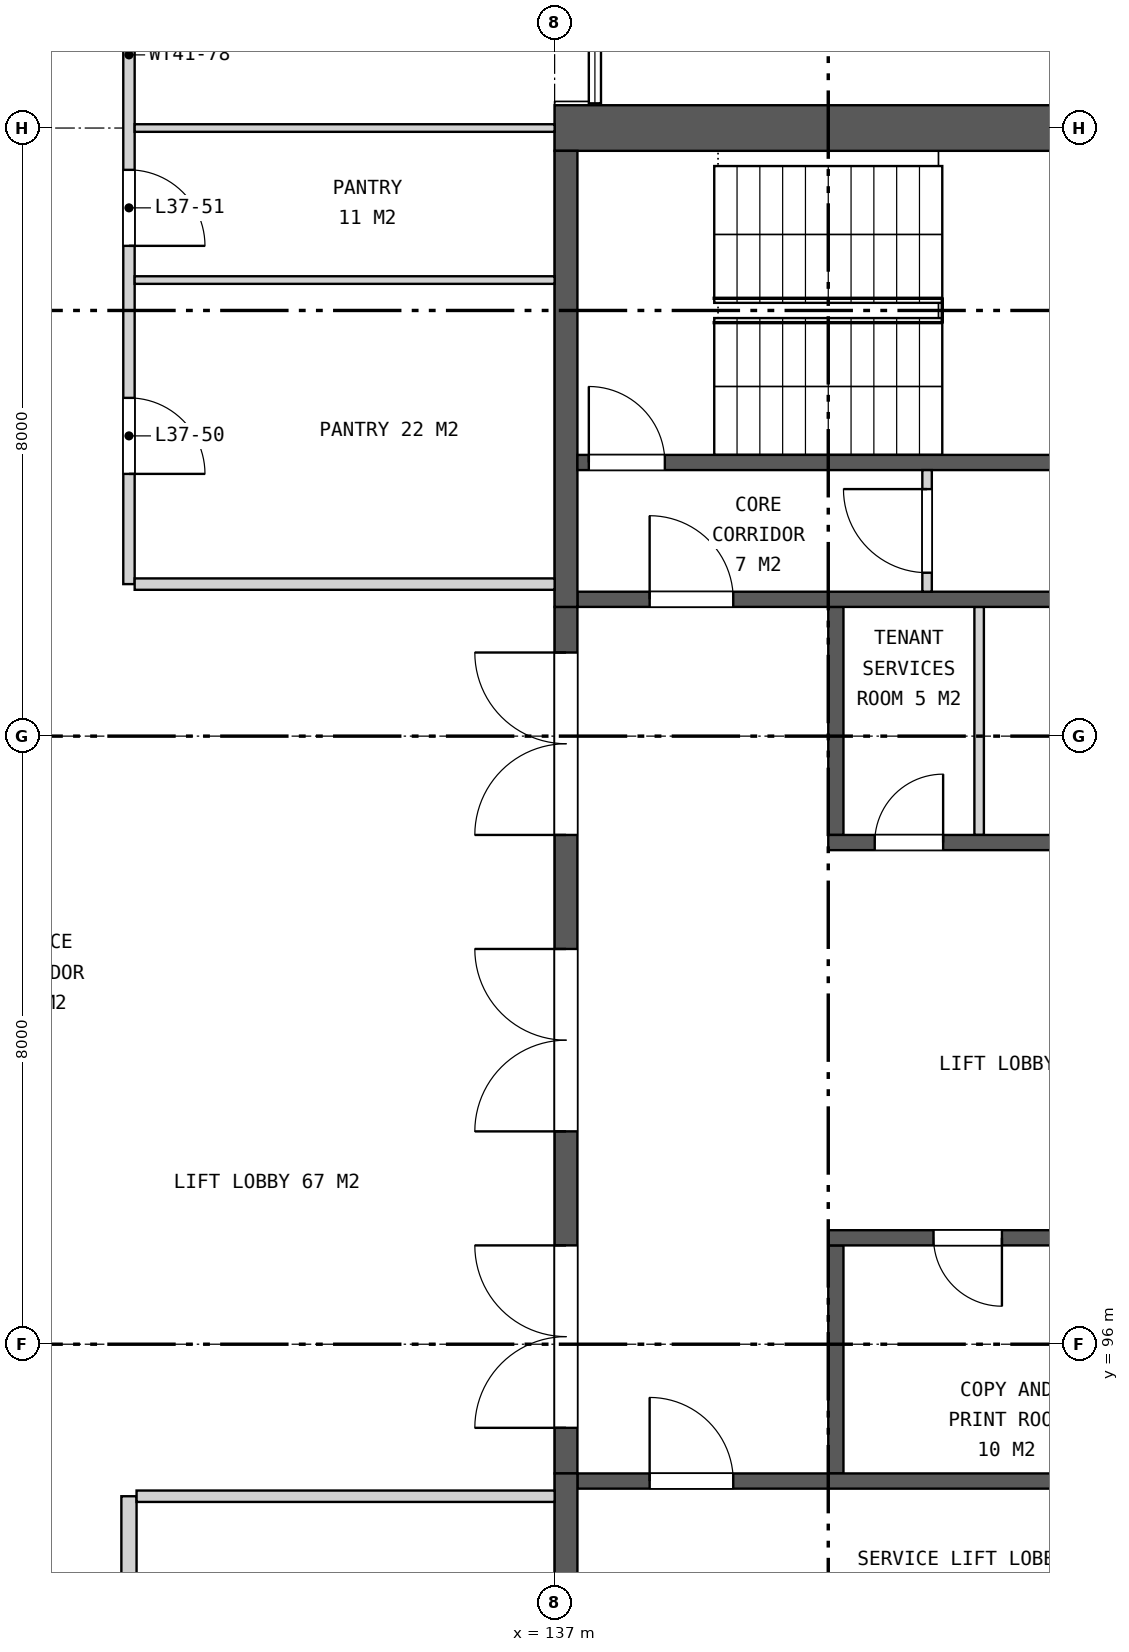
"""IFC4 building model, lengths in metres.
Left out: names, types, materials, properties, quantities, classifications, styles, units other than length and angle.
Written with IfcOpenShell. Run it as: python <this file> out.ifc"""

import sys

from ifc_helpers import new_model, si_unit, direction, frame, frame_2d, origin, place, context, subcontext, project, spatial, rectangle, extrude, element, fill, save


model = new_model("IFC4")
c1 = context("Model", 3, precision=1e-05, world=origin(), true_north=direction((0.0, 1.0)))
c2 = subcontext(c1, "Body", "Model", "MODEL_VIEW")
j1 = project(units=[si_unit("LENGTHUNIT", "METRE"), si_unit("PLANEANGLEUNIT", "RADIAN")], contexts=[c1])
p1 = place(None, origin())
s1 = spatial("IfcSite", under=j1, at=p1, CompositionType="ELEMENT")
p2 = place(p1, origin())
s2 = spatial("IfcBuilding", under=s1, at=p2, CompositionType="ELEMENT")
p3 = place(p2, frame((0.0, 0.0, 178.9)))
s3 = spatial("IfcBuildingStorey", under=s2, at=p3, CompositionType="ELEMENT", Elevation=178.9)
p4 = place(p3, frame((137.0, 112.0, 0.0), z_axis=(0.0, 0.0, 1.0), x_axis=(1.0, 0.0, 0.0)))
e1 = element("IfcWall", 1, at=p4, inside=s3, PredefinedType="SHEAR", context=c2, shape_type="SweptSolid", body=[
    extrude(rectangle(XDim=7.1, YDim=0.6, at=frame_2d((3.55, 0.0))), origin(), (0.0, 0.0, 1.0), 4.2),
])
p5 = place(p3, frame((137.15, 94.3, 0.0), z_axis=(0.0, 0.0, 1.0), x_axis=(0.0, 1.0, 0.0)))
e2 = element("IfcWall", 2, at=p5, inside=s3, PredefinedType="SHEAR", context=c2, shape_type="SweptSolid", body=[
    extrude(rectangle(XDim=11.4, YDim=0.3, at=frame_2d((5.7, 0.0))), origin(), (0.0, 0.0, 1.0), 4.2),
])
p6 = place(p5, frame((0.6, 0.0, 0.0)))
e3 = element("IfcOpeningElement", 3, at=p6, cuts=e2, PredefinedType="OPENING", context=c2, shape_type="SweptSolid", body=[
    extrude(rectangle(XDim=2.4, YDim=2.4, at=frame_2d((1.2, 1.2))), frame((0.0, 0.16, 0.0), z_axis=(0.0, -1.0, 0.0), x_axis=(1.0, 0.0, 0.0)), (0.0, 0.0, 1.0), 0.32),
])
p7 = place(p5, frame((4.5, 0.0, 0.0)))
e4 = element("IfcOpeningElement", 4, at=p7, cuts=e2, PredefinedType="OPENING", context=c2, shape_type="SweptSolid", body=[
    extrude(rectangle(XDim=2.4, YDim=2.4, at=frame_2d((1.2, 1.2))), frame((0.0, 0.16, 0.0), z_axis=(0.0, -1.0, 0.0), x_axis=(1.0, 0.0, 0.0)), (0.0, 0.0, 1.0), 0.32),
])
p8 = place(p5, frame((8.4, 0.0, 0.0)))
e5 = element("IfcOpeningElement", 5, at=p8, cuts=e2, PredefinedType="OPENING", context=c2, shape_type="SweptSolid", body=[
    extrude(rectangle(XDim=2.4, YDim=2.4, at=frame_2d((1.2, 1.2))), frame((0.0, 0.16, 0.0), z_axis=(0.0, -1.0, 0.0), x_axis=(1.0, 0.0, 0.0)), (0.0, 0.0, 1.0), 0.32),
])
p9 = place(p3, frame((140.7, 102.7, 0.0), z_axis=(0.0, 0.0, 1.0), x_axis=(0.0, 1.0, 0.0)))
e6 = element("IfcWall", 6, at=p9, inside=s3, PredefinedType="SHEAR", context=c2, shape_type="SweptSolid", body=[
    extrude(rectangle(XDim=3.0, YDim=0.2, at=frame_2d((1.5, 0.0))), origin(), (0.0, 0.0, 1.0), 4.2),
])
p10 = place(p3, frame((142.585, 102.7, 0.0), z_axis=(0.0, 0.0, 1.0), x_axis=(0.0, 1.0, 0.0)))
e7 = element("IfcWall", 7, at=p10, inside=s3, PredefinedType="PARTITIONING", context=c2, shape_type="SweptSolid", body=[
    extrude(rectangle(XDim=3.0, YDim=0.125, at=frame_2d((1.5, 0.0))), origin(), (0.0, 0.0, 1.0), 4.2),
])
p11 = place(p3, frame((140.6, 102.6, 0.0), z_axis=(0.0, 0.0, 1.0), x_axis=(1.0, 0.0, 0.0)))
e8 = element("IfcWall", 8, at=p11, inside=s3, PredefinedType="SHEAR", context=c2, shape_type="SweptSolid", body=[
    extrude(rectangle(XDim=12.1, YDim=0.2, at=frame_2d((6.05, 0.0))), origin(), (0.0, 0.0, 1.0), 4.2),
])
p12 = place(p11, frame((0.611, 0.0, 0.0)))
e9 = element("IfcOpeningElement", 9, at=p12, cuts=e8, PredefinedType="OPENING", context=c2, shape_type="SweptSolid", body=[
    extrude(rectangle(XDim=0.9, YDim=2.1, at=frame_2d((0.45, 1.05))), frame((0.0, 0.11, 0.0), z_axis=(0.0, -1.0, 0.0), x_axis=(1.0, 0.0, 0.0)), (0.0, 0.0, 1.0), 0.22),
])
p13 = place(p11, frame((4.808, 0.0, 0.0)))
e10 = element("IfcOpeningElement", 10, at=p13, cuts=e8, PredefinedType="OPENING", context=c2, shape_type="SweptSolid", body=[
    extrude(rectangle(XDim=0.9, YDim=2.1, at=frame_2d((0.45, 1.05))), frame((0.0, 0.11, 0.0), z_axis=(0.0, -1.0, 0.0), x_axis=(1.0, 0.0, 0.0)), (0.0, 0.0, 1.0), 0.22),
])
p14 = place(p11, frame((9.896, 0.0, 0.0)))
e11 = element("IfcOpeningElement", 11, at=p14, cuts=e8, PredefinedType="OPENING", context=c2, shape_type="SweptSolid", body=[
    extrude(rectangle(XDim=0.9, YDim=2.1, at=frame_2d((0.45, 1.05))), frame((0.0, 0.11, 0.0), z_axis=(0.0, -1.0, 0.0), x_axis=(1.0, 0.0, 0.0)), (0.0, 0.0, 1.0), 0.22),
])
p15 = place(p3, frame((140.7, 94.3, 0.0), z_axis=(0.0, 0.0, 1.0), x_axis=(0.0, 1.0, 0.0)))
e12 = element("IfcWall", 12, at=p15, inside=s3, PredefinedType="SHEAR", context=c2, shape_type="SweptSolid", body=[
    extrude(rectangle(XDim=3.0, YDim=0.2, at=frame_2d((1.5, 0.0))), origin(), (0.0, 0.0, 1.0), 4.2),
])
p16 = place(p3, frame((140.6, 97.4, 0.0), z_axis=(0.0, 0.0, 1.0), x_axis=(1.0, 0.0, 0.0)))
e13 = element("IfcWall", 13, at=p16, inside=s3, PredefinedType="SHEAR", context=c2, shape_type="SweptSolid", body=[
    extrude(rectangle(XDim=12.1, YDim=0.2, at=frame_2d((6.05, 0.0))), origin(), (0.0, 0.0, 1.0), 4.2),
])
p17 = place(p16, frame((1.385, 0.0, 0.0)))
e14 = element("IfcOpeningElement", 14, at=p17, cuts=e13, PredefinedType="OPENING", context=c2, shape_type="SweptSolid", body=[
    extrude(rectangle(XDim=0.9, YDim=2.1, at=frame_2d((0.45, 1.05))), frame((0.0, 0.11, 0.0), z_axis=(0.0, -1.0, 0.0), x_axis=(1.0, 0.0, 0.0)), (0.0, 0.0, 1.0), 0.22),
])
p18 = place(p16, frame((7.397, 0.0, 0.0)))
e15 = element("IfcOpeningElement", 15, at=p18, cuts=e13, PredefinedType="OPENING", context=c2, shape_type="SweptSolid", body=[
    extrude(rectangle(XDim=0.9, YDim=2.1, at=frame_2d((0.45, 1.05))), frame((0.0, 0.11, 0.0), z_axis=(0.0, -1.0, 0.0), x_axis=(1.0, 0.0, 0.0)), (0.0, 0.0, 1.0), 0.22),
])
p19 = place(p3, frame((137.3, 105.8, 0.0), z_axis=(0.0, 0.0, 1.0), x_axis=(1.0, 0.0, 0.0)))
e16 = element("IfcWall", 16, at=p19, inside=s3, PredefinedType="SHEAR", context=c2, shape_type="SweptSolid", body=[
    extrude(rectangle(XDim=15.4, YDim=0.2, at=frame_2d((7.7, 0.0))), origin(), (0.0, 0.0, 1.0), 4.2),
])
p20 = place(p19, frame((0.95, 0.0, 0.0)))
e17 = element("IfcOpeningElement", 17, at=p20, cuts=e16, PredefinedType="OPENING", context=c2, shape_type="SweptSolid", body=[
    extrude(rectangle(XDim=1.1, YDim=2.1, at=frame_2d((0.55, 1.05))), frame((0.0, 0.11, 0.0), z_axis=(0.0, -1.0, 0.0), x_axis=(1.0, 0.0, 0.0)), (0.0, 0.0, 1.0), 0.22),
])
p21 = place(p3, frame((137.15, 105.7, 0.0), z_axis=(0.0, 0.0, 1.0), x_axis=(0.0, 1.0, 0.0)))
e18 = element("IfcWall", 18, at=p21, inside=s3, PredefinedType="SHEAR", context=c2, shape_type="SweptSolid", body=[
    extrude(rectangle(XDim=6.0, YDim=0.3, at=frame_2d((3.0, 0.0))), origin(), (0.0, 0.0, 1.0), 4.2),
])
p22 = place(p3, frame((137.3, 107.6, 0.0), z_axis=(0.0, 0.0, 1.0), x_axis=(1.0, 0.0, 0.0)))
e19 = element("IfcWall", 19, at=p22, inside=s3, PredefinedType="SHEAR", context=c2, shape_type="SweptSolid", body=[
    extrude(rectangle(XDim=6.8, YDim=0.2, at=frame_2d((3.4, 0.0))), origin(), (0.0, 0.0, 1.0), 4.2),
])
p23 = place(p22, frame((0.15, 0.0, 0.0)))
e20 = element("IfcOpeningElement", 20, at=p23, cuts=e19, PredefinedType="OPENING", context=c2, shape_type="SweptSolid", body=[
    extrude(rectangle(XDim=1.0, YDim=2.1, at=frame_2d((0.5, 1.05))), frame((0.0, 0.11, 0.0), z_axis=(0.0, -1.0, 0.0), x_axis=(1.0, 0.0, 0.0)), (0.0, 0.0, 1.0), 0.22),
])
p24 = place(p3, frame((141.9, 105.9, 0.0), z_axis=(0.0, 0.0, 1.0), x_axis=(0.0, 1.0, 0.0)))
e21 = element("IfcWall", 21, at=p24, inside=s3, PredefinedType="PARTITIONING", context=c2, shape_type="SweptSolid", body=[
    extrude(rectangle(XDim=1.6, YDim=0.125, at=frame_2d((0.8, 0.0))), origin(), (0.0, 0.0, 1.0), 4.2),
])
p25 = place(p24, frame((0.25, 0.0, 0.0)))
e22 = element("IfcOpeningElement", 22, at=p25, cuts=e21, PredefinedType="OPENING", context=c2, shape_type="SweptSolid", body=[
    extrude(rectangle(XDim=1.1, YDim=2.1, at=frame_2d((0.55, 1.05))), frame((0.0, 0.073, 0.0), z_axis=(0.0, -1.0, 0.0), x_axis=(1.0, 0.0, 0.0)), (0.0, 0.0, 1.0), 0.145),
])
p26 = place(p3, frame((137.3, 94.2, 0.0), z_axis=(0.0, 0.0, 1.0), x_axis=(1.0, 0.0, 0.0)))
e23 = element("IfcWall", 23, at=p26, inside=s3, PredefinedType="SHEAR", context=c2, shape_type="SweptSolid", body=[
    extrude(rectangle(XDim=15.4, YDim=0.2, at=frame_2d((7.7, 0.0))), origin(), (0.0, 0.0, 1.0), 4.2),
])
p27 = place(p26, frame((0.95, 0.0, 0.0)))
e24 = element("IfcOpeningElement", 24, at=p27, cuts=e23, PredefinedType="OPENING", context=c2, shape_type="SweptSolid", body=[
    extrude(rectangle(XDim=1.1, YDim=2.1, at=frame_2d((0.55, 1.05))), frame((0.0, 0.11, 0.0), z_axis=(0.0, -1.0, 0.0), x_axis=(1.0, 0.0, 0.0)), (0.0, 0.0, 1.0), 0.22),
])
p28 = place(p3, frame((137.15, 88.3, 0.0), z_axis=(0.0, 0.0, 1.0), x_axis=(0.0, 1.0, 0.0)))
e25 = element("IfcWall", 25, at=p28, inside=s3, PredefinedType="SHEAR", context=c2, shape_type="SweptSolid", body=[
    extrude(rectangle(XDim=6.0, YDim=0.3, at=frame_2d((3.0, 0.0))), origin(), (0.0, 0.0, 1.0), 4.2),
])
p29 = place(p3, frame((131.4, 80.075, 0.0), z_axis=(0.0, 0.0, 1.0), x_axis=(0.0, 1.0, 0.0)))
e26 = element("IfcWall", 26, at=p29, inside=s3, PredefinedType="SOLIDWALL", context=c2, shape_type="SweptSolid", body=[
    extrude(rectangle(XDim=13.925, YDim=0.2, at=frame_2d((6.962, 0.0))), origin(), (0.0, 0.0, 1.0), 3.44),
])
p30 = place(p29, frame((11.675, 0.0, 0.0)))
e27 = element("IfcOpeningElement", 27, at=p30, cuts=e26, PredefinedType="OPENING", context=c2, shape_type="SweptSolid", body=[
    extrude(rectangle(XDim=1.0, YDim=2.1, at=frame_2d((0.5, 1.05))), frame((0.0, 0.11, 0.0), z_axis=(0.0, -1.0, 0.0), x_axis=(1.0, 0.0, 0.0)), (0.0, 0.0, 1.0), 0.22),
])
p31 = place(p29, frame((8.675, 0.0, 0.0)))
e28 = element("IfcOpeningElement", 28, at=p31, cuts=e26, PredefinedType="OPENING", context=c2, shape_type="SweptSolid", body=[
    extrude(rectangle(XDim=1.0, YDim=2.1, at=frame_2d((0.5, 1.05))), frame((0.0, 0.11, 0.0), z_axis=(0.0, -1.0, 0.0), x_axis=(1.0, 0.0, 0.0)), (0.0, 0.0, 1.0), 0.22),
])
p32 = place(p29, frame((3.45, 0.0, 0.0)))
e29 = element("IfcOpeningElement", 29, at=p32, cuts=e26, PredefinedType="OPENING", context=c2, shape_type="SweptSolid", body=[
    extrude(rectangle(XDim=1.0, YDim=2.1, at=frame_2d((0.5, 1.05))), frame((0.0, 0.11, 0.0), z_axis=(0.0, -1.0, 0.0), x_axis=(1.0, 0.0, 0.0)), (0.0, 0.0, 1.0), 0.22),
])
p33 = place(p3, frame((131.4, 106.0, 0.0), z_axis=(0.0, 0.0, 1.0), x_axis=(0.0, 1.0, 0.0)))
e30 = element("IfcWall", 30, at=p33, inside=s3, PredefinedType="PARTITIONING", context=c2, shape_type="SweptSolid", body=[
    extrude(rectangle(XDim=13.925, YDim=0.15, at=frame_2d((6.962, 0.0))), origin(), (0.0, 0.0, 1.0), 3.44),
])
p34 = place(p33, frame((1.45, 0.0, 0.0)))
e31 = element("IfcOpeningElement", 31, at=p34, cuts=e30, PredefinedType="OPENING", context=c2, shape_type="SweptSolid", body=[
    extrude(rectangle(XDim=1.0, YDim=2.1, at=frame_2d((0.5, 1.05))), frame((0.0, 0.085, 0.0), z_axis=(0.0, -1.0, 0.0), x_axis=(1.0, 0.0, 0.0)), (0.0, 0.0, 1.0), 0.17),
])
p35 = place(p33, frame((4.45, 0.0, 0.0)))
e32 = element("IfcOpeningElement", 32, at=p35, cuts=e30, PredefinedType="OPENING", context=c2, shape_type="SweptSolid", body=[
    extrude(rectangle(XDim=1.0, YDim=2.1, at=frame_2d((0.5, 1.05))), frame((0.0, 0.085, 0.0), z_axis=(0.0, -1.0, 0.0), x_axis=(1.0, 0.0, 0.0)), (0.0, 0.0, 1.0), 0.17),
])
p36 = place(p33, frame((9.45, 0.0, 0.0)))
e33 = element("IfcOpeningElement", 33, at=p36, cuts=e30, PredefinedType="OPENING", context=c2, shape_type="SweptSolid", body=[
    extrude(rectangle(XDim=1.0, YDim=2.1, at=frame_2d((0.5, 1.05))), frame((0.0, 0.085, 0.0), z_axis=(0.0, -1.0, 0.0), x_axis=(1.0, 0.0, 0.0)), (0.0, 0.0, 1.0), 0.17),
])
p37 = place(p3, frame((131.5, 94.0, 0.0), z_axis=(0.0, 0.0, 1.0), x_axis=(1.0, 0.0, 0.0)))
e34 = element("IfcWall", 34, at=p37, inside=s3, PredefinedType="PARTITIONING", context=c2, shape_type="SweptSolid", body=[
    extrude(rectangle(XDim=5.5, YDim=0.15, at=frame_2d((2.75, 0.0))), origin(), (0.0, 0.0, 1.0), 3.44),
])
p38 = place(p3, frame((131.475, 106.0, 0.0), z_axis=(0.0, 0.0, 1.0), x_axis=(1.0, 0.0, 0.0)))
e35 = element("IfcWall", 35, at=p38, inside=s3, PredefinedType="PARTITIONING", context=c2, shape_type="SweptSolid", body=[
    extrude(rectangle(XDim=5.525, YDim=0.15, at=frame_2d((2.762, 0.0))), origin(), (0.0, 0.0, 1.0), 3.44),
])
for number, where, z_axis, x_axis in (
    (36, (131.475, 110.0, 0.0), (0.0, 0.0, 1.0), (1.0, 0.0, 0.0)),
    (37, (131.475, 112.0, 0.0), (0.0, 0.0, 1.0), (1.0, 0.0, 0.0)),
):
    element("IfcWall", number, at=place(p3, frame(where, z_axis=z_axis, x_axis=x_axis)), inside=s3, PredefinedType="PARTITIONING", context=c2, shape_type="SweptSolid", body=[
        extrude(rectangle(XDim=5.525, YDim=0.1, at=frame_2d((2.762, 0.0))), origin(), (0.0, 0.0, 1.0), 3.44),
    ])
p39 = place(p6, origin())
e38 = element("IfcDoor", 38, at=p39, inside=s3, OperationType="DOUBLE_DOOR_SINGLE_SWING", PredefinedType="DOOR", context=c2, shape_type="SweptSolid", body=[
    extrude(rectangle(XDim=2.4, YDim=2.4, at=frame_2d((1.2, 1.2))), frame((0.0, 0.025, 0.0), z_axis=(0.0, -1.0, 0.0), x_axis=(1.0, 0.0, 0.0)), (0.0, 0.0, 1.0), 0.05),
])
fill(e3, e38)
p40 = place(p7, origin())
e39 = element("IfcDoor", 39, at=p40, inside=s3, OperationType="DOUBLE_DOOR_SINGLE_SWING", PredefinedType="DOOR", context=c2, shape_type="SweptSolid", body=[
    extrude(rectangle(XDim=2.4, YDim=2.4, at=frame_2d((1.2, 1.2))), frame((0.0, 0.025, 0.0), z_axis=(0.0, -1.0, 0.0), x_axis=(1.0, 0.0, 0.0)), (0.0, 0.0, 1.0), 0.05),
])
fill(e4, e39)
p41 = place(p8, origin())
e40 = element("IfcDoor", 40, at=p41, inside=s3, OperationType="DOUBLE_DOOR_SINGLE_SWING", PredefinedType="DOOR", context=c2, shape_type="SweptSolid", body=[
    extrude(rectangle(XDim=2.4, YDim=2.4, at=frame_2d((1.2, 1.2))), frame((0.0, 0.025, 0.0), z_axis=(0.0, -1.0, 0.0), x_axis=(1.0, 0.0, 0.0)), (0.0, 0.0, 1.0), 0.05),
])
fill(e5, e40)
p42 = place(p12, origin())
e41 = element("IfcDoor", 41, at=p42, inside=s3, OperationType="SINGLE_SWING_RIGHT", PredefinedType="DOOR", context=c2, shape_type="SweptSolid", body=[
    extrude(rectangle(XDim=0.9, YDim=2.1, at=frame_2d((0.45, 1.05))), frame((0.0, 0.025, 0.0), z_axis=(0.0, -1.0, 0.0), x_axis=(1.0, 0.0, 0.0)), (0.0, 0.0, 1.0), 0.05),
])
fill(e9, e41)
p43 = place(p17, frame((0.9, 0.0, 0.0), z_axis=(0.0, 0.0, 1.0), x_axis=(-1.0, 0.0, 0.0)))
e42 = element("IfcDoor", 42, at=p43, inside=s3, OperationType="SINGLE_SWING_LEFT", PredefinedType="DOOR", context=c2, shape_type="SweptSolid", body=[
    extrude(rectangle(XDim=0.9, YDim=2.1, at=frame_2d((0.45, 1.05))), frame((0.0, 0.025, 0.0), z_axis=(0.0, -1.0, 0.0), x_axis=(1.0, 0.0, 0.0)), (0.0, 0.0, 1.0), 0.05),
])
fill(e14, e42)
p44 = place(p20, origin())
e43 = element("IfcDoor", 43, at=p44, inside=s3, OperationType="SINGLE_SWING_LEFT", PredefinedType="DOOR", context=c2, shape_type="SweptSolid", body=[
    extrude(rectangle(XDim=1.1, YDim=2.1, at=frame_2d((0.55, 1.05))), frame((0.0, 0.025, 0.0), z_axis=(0.0, -1.0, 0.0), x_axis=(1.0, 0.0, 0.0)), (0.0, 0.0, 1.0), 0.05),
])
fill(e17, e43)
p45 = place(p23, origin())
e44 = element("IfcDoor", 44, at=p45, inside=s3, OperationType="SINGLE_SWING_LEFT", PredefinedType="DOOR", context=c2, shape_type="SweptSolid", body=[
    extrude(rectangle(XDim=1.0, YDim=2.1, at=frame_2d((0.5, 1.05))), frame((0.0, 0.025, 0.0), z_axis=(0.0, -1.0, 0.0), x_axis=(1.0, 0.0, 0.0)), (0.0, 0.0, 1.0), 0.05),
])
fill(e20, e44)
p46 = place(p25, origin())
e45 = element("IfcDoor", 45, at=p46, inside=s3, OperationType="SINGLE_SWING_RIGHT", PredefinedType="DOOR", context=c2, shape_type="SweptSolid", body=[
    extrude(rectangle(XDim=1.1, YDim=2.1, at=frame_2d((0.55, 1.05))), frame((0.0, 0.025, 0.0), z_axis=(0.0, -1.0, 0.0), x_axis=(1.0, 0.0, 0.0)), (0.0, 0.0, 1.0), 0.05),
])
fill(e22, e45)
p47 = place(p27, origin())
e46 = element("IfcDoor", 46, at=p47, inside=s3, OperationType="SINGLE_SWING_LEFT", PredefinedType="DOOR", context=c2, shape_type="SweptSolid", body=[
    extrude(rectangle(XDim=1.1, YDim=2.1, at=frame_2d((0.55, 1.05))), frame((0.0, 0.025, 0.0), z_axis=(0.0, -1.0, 0.0), x_axis=(1.0, 0.0, 0.0)), (0.0, 0.0, 1.0), 0.05),
])
fill(e24, e46)
p48 = place(p34, frame((1.0, 0.0, 0.0), z_axis=(0.0, 0.0, 1.0), x_axis=(-1.0, 0.0, 0.0)))
e47 = element("IfcDoor", 47, at=p48, inside=s3, OperationType="SINGLE_SWING_RIGHT", PredefinedType="DOOR", context=c2, shape_type="SweptSolid", body=[
    extrude(rectangle(XDim=1.0, YDim=2.1, at=frame_2d((0.5, 1.05))), frame((0.0, 0.025, 0.0), z_axis=(0.0, -1.0, 0.0), x_axis=(1.0, 0.0, 0.0)), (0.0, 0.0, 1.0), 0.05),
])
fill(e31, e47)
p49 = place(p35, frame((1.0, 0.0, 0.0), z_axis=(0.0, 0.0, 1.0), x_axis=(-1.0, 0.0, 0.0)))
e48 = element("IfcDoor", 48, at=p49, inside=s3, OperationType="SINGLE_SWING_RIGHT", PredefinedType="DOOR", context=c2, shape_type="SweptSolid", body=[
    extrude(rectangle(XDim=1.0, YDim=2.1, at=frame_2d((0.5, 1.05))), frame((0.0, 0.025, 0.0), z_axis=(0.0, -1.0, 0.0), x_axis=(1.0, 0.0, 0.0)), (0.0, 0.0, 1.0), 0.05),
])
fill(e32, e48)
save(model, sys.argv[1])
